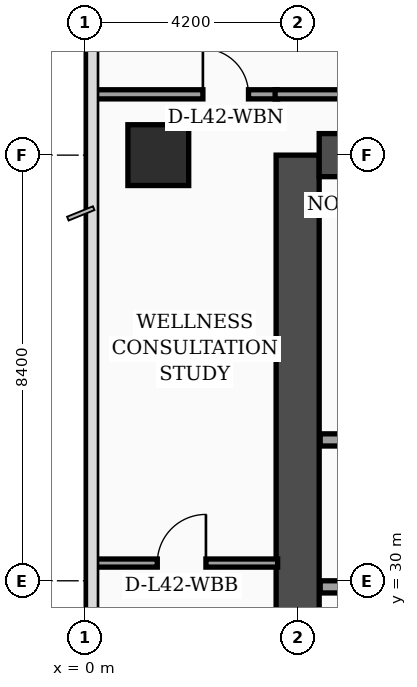
"""IFC4 building model, lengths in metres.
Left out: names, types, materials, properties, quantities, classifications, styles, units other than length and angle.
Written with IfcOpenShell. Run it as: python <this file> out.ifc"""

import sys

from ifc_helpers import new_model, si_unit, direction, frame, frame_2d, origin, origin_2d, place, context, subcontext, project, spatial, rectangle, extrude, element, fill, save


model = new_model("IFC4")
c1 = context("Model", 3, precision=1e-05, world=origin(), true_north=direction((0.0, 1.0)))
c2 = subcontext(c1, "Body", "Model", "MODEL_VIEW")
j1 = project(units=[si_unit("LENGTHUNIT", "METRE"), si_unit("PLANEANGLEUNIT", "RADIAN")], contexts=[c1])
p1 = place(None, origin())
s1 = spatial("IfcSite", under=j1, at=p1, CompositionType="ELEMENT")
p2 = place(p1, origin())
s2 = spatial("IfcBuilding", under=s1, at=p2, CompositionType="ELEMENT")
p3 = place(p2, frame((0.0, 0.0, 171.3)))
s3 = spatial("IfcBuildingStorey", under=s2, at=p3, CompositionType="ELEMENT", Elevation=171.3)
p4 = place(p3, frame((4.2, 16.8, 0.0), z_axis=(0.0, 0.0, 1.0), x_axis=(0.0, 1.0, 0.0)))
e1 = element("IfcWall", 1, at=p4, inside=s3, PredefinedType="SHEAR", context=c2, shape_type="SweptSolid", body=[
    extrude(rectangle(XDim=21.6, YDim=0.85, at=frame_2d((10.8, 0.0))), origin(), (0.0, 0.0, 1.0), 3.56),
])
p5 = place(p3, frame((4.625, 38.4, 0.0), z_axis=(0.0, 0.0, 1.0), x_axis=(1.0, 0.0, 0.0)))
e2 = element("IfcWall", 2, at=p5, inside=s3, PredefinedType="SHEAR", context=c2, shape_type="SweptSolid", body=[
    extrude(rectangle(XDim=9.95, YDim=0.85, at=frame_2d((4.975, 0.0))), origin(), (0.0, 0.0, 1.0), 3.56),
])
p6 = place(p3, frame((1.45, 38.4, 0.0), z_axis=(0.0, 0.0, 1.0), x_axis=(1.0, 0.0, 0.0)))
e3 = element("IfcColumn", 3, at=p6, inside=s3, PredefinedType="COLUMN", context=c2, shape_type="SweptSolid", body=[
    extrude(rectangle(XDim=1.2, YDim=1.2, at=origin_2d()), origin(), (0.0, 0.0, 1.0), 3.56),
])
p7 = place(p3, frame((4.645, 29.88, 0.0), z_axis=(0.0, 0.0, 1.0), x_axis=(1.0, 0.0, 0.0)))
e4 = element("IfcWall", 4, at=p7, inside=s3, PredefinedType="SOLIDWALL", context=c2, shape_type="SweptSolid", body=[
    extrude(rectangle(XDim=4.775, YDim=0.24, at=frame_2d((2.387, 0.0))), origin(), (0.0, 0.0, 1.0), 3.56),
])
p8 = place(p7, frame((0.45, 0.0, 0.0)))
e5 = element("IfcOpeningElement", 5, at=p8, cuts=e4, PredefinedType="OPENING", context=c2, shape_type="SweptSolid", body=[
    extrude(rectangle(XDim=1.3, YDim=2.35, at=frame_2d((0.65, 1.175))), frame((0.0, 0.13, 0.0), z_axis=(0.0, -1.0, 0.0), x_axis=(1.0, 0.0, 0.0)), (0.0, 0.0, 1.0), 0.26),
])
p9 = place(p3, frame((4.645, 32.78, 0.0), z_axis=(0.0, 0.0, 1.0), x_axis=(1.0, 0.0, 0.0)))
e6 = element("IfcWall", 6, at=p9, inside=s3, PredefinedType="SOLIDWALL", context=c2, shape_type="SweptSolid", body=[
    extrude(rectangle(XDim=4.775, YDim=0.24, at=frame_2d((2.387, 0.0))), origin(), (0.0, 0.0, 1.0), 3.19),
])
p10 = place(p3, frame((0.08, 30.35, 0.0), z_axis=(0.0, 0.0, 1.0), x_axis=(1.0, 0.0, 0.0)))
e7 = element("IfcWall", 7, at=p10, inside=s3, PredefinedType="PARTITIONING", context=c2, shape_type="SweptSolid", body=[
    extrude(rectangle(XDim=3.725, YDim=0.16, at=frame_2d((1.862, 0.0))), origin(), (0.0, 0.0, 1.0), 3.04),
])
p11 = place(p10, frame((1.35, 0.0, 0.0)))
e8 = element("IfcOpeningElement", 8, at=p11, cuts=e7, PredefinedType="OPENING", context=c2, shape_type="SweptSolid", body=[
    extrude(rectangle(XDim=0.96, YDim=2.2, at=frame_2d((0.48, 1.1))), frame((0.0, 0.09, 0.0), z_axis=(0.0, -1.0, 0.0), x_axis=(1.0, 0.0, 0.0)), (0.0, 0.0, 1.0), 0.18),
])
p12 = place(p3, frame((0.08, 39.6, 0.0), z_axis=(0.0, 0.0, 1.0), x_axis=(1.0, 0.0, 0.0)))
e9 = element("IfcWall", 9, at=p12, inside=s3, PredefinedType="PARTITIONING", context=c2, shape_type="SweptSolid", body=[
    extrude(rectangle(XDim=3.725, YDim=0.18, at=frame_2d((1.862, 0.0))), origin(), (0.0, 0.0, 1.0), 2.94),
])
p13 = place(p12, frame((2.25, 0.0, 0.0)))
e10 = element("IfcOpeningElement", 10, at=p13, cuts=e9, PredefinedType="OPENING", context=c2, shape_type="SweptSolid", body=[
    extrude(rectangle(XDim=0.9, YDim=2.15, at=frame_2d((0.45, 1.075))), frame((0.0, 0.1, 0.0), z_axis=(0.0, -1.0, 0.0), x_axis=(1.0, 0.0, 0.0)), (0.0, 0.0, 1.0), 0.2),
])
p14 = place(p3, frame((3.755, 39.6, 0.0), z_axis=(0.0, 0.0, 1.0), x_axis=(1.0, 0.0, 0.0)))
e11 = element("IfcWall", 11, at=p14, inside=s3, PredefinedType="PARTITIONING", context=c2, shape_type="SweptSolid", body=[
    extrude(rectangle(XDim=11.395, YDim=0.18, at=frame_2d((5.698, 0.0))), origin(), (0.0, 0.0, 1.0), 2.94),
])
p15 = place(p11, origin())
e12 = element("IfcDoor", 12, at=p15, inside=s3, OperationType="SINGLE_SWING_RIGHT", PredefinedType="DOOR", context=c2, shape_type="SweptSolid", body=[
    extrude(rectangle(XDim=0.96, YDim=2.2, at=frame_2d((0.48, 1.1))), frame((0.0, 0.025, 0.0), z_axis=(0.0, -1.0, 0.0), x_axis=(1.0, 0.0, 0.0)), (0.0, 0.0, 1.0), 0.05),
])
fill(e8, e12)
p16 = place(p13, origin())
e13 = element("IfcDoor", 13, at=p16, inside=s3, OperationType="SINGLE_SWING_LEFT", PredefinedType="DOOR", context=c2, shape_type="SweptSolid", body=[
    extrude(rectangle(XDim=0.9, YDim=2.15, at=frame_2d((0.45, 1.075))), frame((0.0, 0.025, 0.0), z_axis=(0.0, -1.0, 0.0), x_axis=(1.0, 0.0, 0.0)), (0.0, 0.0, 1.0), 0.05),
])
fill(e10, e13)
save(model, sys.argv[1])
